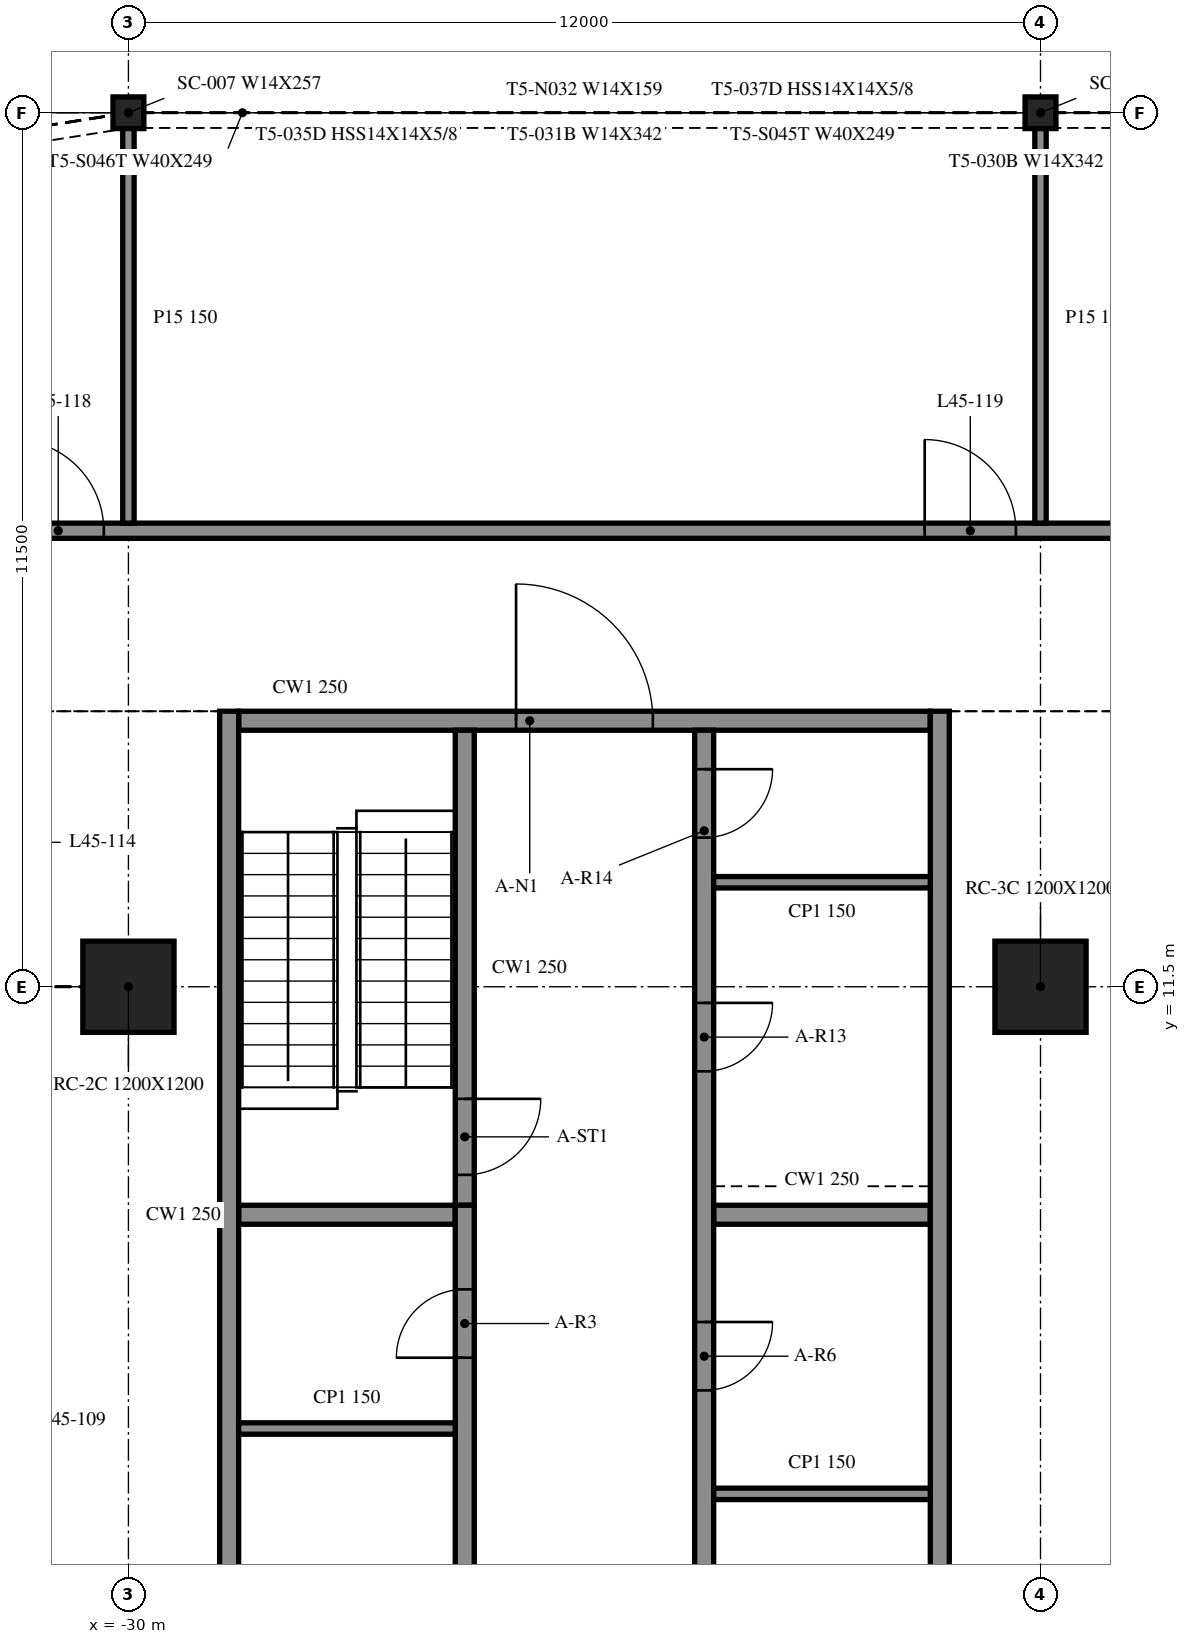
"""IFC4 building model, lengths in metres.
Left out: names, types, materials, properties, quantities, classifications, styles, units other than length and angle.
Written with IfcOpenShell. Run it as: python <this file> out.ifc"""

import sys

from ifc_helpers import new_model, si_unit, direction, frame, frame_2d, origin, origin_2d, place, context, subcontext, project, spatial, rectangle, i_section, extrude, element, fill, save


model = new_model("IFC4")
c1 = context("Model", 3, precision=1e-05, world=origin(), true_north=direction((0.0, 1.0)))
c2 = subcontext(c1, "Body", "Model", "MODEL_VIEW")
j1 = project(units=[si_unit("LENGTHUNIT", "METRE"), si_unit("PLANEANGLEUNIT", "RADIAN")], contexts=[c1])
p1 = place(None, origin())
s1 = spatial("IfcSite", under=j1, at=p1, CompositionType="ELEMENT")
p2 = place(p1, origin())
s2 = spatial("IfcBuilding", under=s1, at=p2, CompositionType="ELEMENT")
p3 = place(p2, frame((0.0, 0.0, 189.6)))
s3 = spatial("IfcBuildingStorey", under=s2, at=p3, CompositionType="ELEMENT", Elevation=189.6)
for number, where, z_axis, x_axis in (
    (1, (-30.0, 11.5, -0.4), (0.0, 0.0, 1.0), (1.0, 0.0, 0.0)),
    (2, (-18.0, 11.5, -0.4), (0.0, 0.0, 1.0), (1.0, 0.0, 0.0)),
):
    element("IfcColumn", number, at=place(p3, frame(where, z_axis=z_axis, x_axis=x_axis)), inside=s3, PredefinedType="COLUMN", context=c2, shape_type="SweptSolid", body=[
        extrude(rectangle(XDim=1.2, YDim=1.2, at=origin_2d()), origin(), (0.0, 0.0, 1.0), 4.36),
    ])
for number, where, z_axis, x_axis in (
    (3, (-18.0, 23.0, -0.4), (0.0, 0.0, 1.0), (1.0, 0.0, 0.0)),
    (4, (-30.0, 23.0, -0.4), (0.0, 0.0, 1.0), (1.0, 0.0, 0.0)),
):
    element("IfcColumn", number, at=place(p3, frame(where, z_axis=z_axis, x_axis=x_axis)), inside=s3, PredefinedType="COLUMN", context=c2, shape_type="SweptSolid", body=[
        extrude(i_section(OverallWidth=0.406, OverallDepth=0.417, WebThickness=0.03, FlangeThickness=0.048, at=origin_2d()), origin(), (0.0, 0.0, 1.0), 4.36),
    ])
for number, where, z_axis, x_axis in (
    (5, (-28.675, 15.125, 0.0), (0.0, 0.0, 1.0), (0.0, -1.0, 0.0)),
    (6, (-19.325, -9.125, 0.0), (0.0, 0.0, 1.0), (0.0, 1.0, 0.0)),
):
    element("IfcWall", number, at=place(p3, frame(where, z_axis=z_axis, x_axis=x_axis)), inside=s3, PredefinedType="SOLIDWALL", context=c2, shape_type="SweptSolid", body=[
        extrude(rectangle(XDim=24.25, YDim=0.25, at=frame_2d((12.125, 0.0))), origin(), (0.0, 0.0, 1.0), 3.96),
    ])
p4 = place(p3, frame((-28.55, 15.0, 0.0), z_axis=(0.0, 0.0, 1.0), x_axis=(1.0, 0.0, 0.0)))
e7 = element("IfcWall", 7, at=p4, inside=s3, PredefinedType="SOLIDWALL", context=c2, shape_type="SweptSolid", body=[
    extrude(rectangle(XDim=9.1, YDim=0.25, at=frame_2d((4.55, 0.0))), origin(), (0.0, 0.0, 1.0), 3.96),
])
p5 = place(p4, frame((3.65, 0.0, 0.0)))
e8 = element("IfcOpeningElement", 8, at=p5, cuts=e7, PredefinedType="OPENING", context=c2, shape_type="SweptSolid", body=[
    extrude(rectangle(XDim=1.8, YDim=2.1, at=frame_2d((0.9, 1.05))), frame((0.0, 0.135, 0.0), z_axis=(0.0, -1.0, 0.0), x_axis=(1.0, 0.0, 0.0)), (0.0, 0.0, 1.0), 0.27),
])
p6 = place(p3, frame((-25.575, -8.875, 0.0), z_axis=(0.0, 0.0, 1.0), x_axis=(0.0, 1.0, 0.0)))
e9 = element("IfcWall", 9, at=p6, inside=s3, PredefinedType="SOLIDWALL", context=c2, shape_type="SweptSolid", body=[
    extrude(rectangle(XDim=17.5, YDim=0.25, at=frame_2d((8.75, 0.0))), origin(), (0.0, 0.0, 1.0), 3.96),
])
p7 = place(p6, frame((7.356, 0.0, 0.0)))
e10 = element("IfcOpeningElement", 10, at=p7, cuts=e9, PredefinedType="OPENING", context=c2, shape_type="SweptSolid", body=[
    extrude(rectangle(XDim=0.9, YDim=2.1, at=frame_2d((0.45, 1.05))), frame((0.0, 0.135, 0.0), z_axis=(0.0, -1.0, 0.0), x_axis=(1.0, 0.0, 0.0)), (0.0, 0.0, 1.0), 0.27),
])
p8 = place(p6, frame((11.425, 0.0, 0.0)))
e11 = element("IfcOpeningElement", 11, at=p8, cuts=e9, PredefinedType="OPENING", context=c2, shape_type="SweptSolid", body=[
    extrude(rectangle(XDim=0.9, YDim=2.1, at=frame_2d((0.45, 1.05))), frame((0.0, 0.135, 0.0), z_axis=(0.0, -1.0, 0.0), x_axis=(1.0, 0.0, 0.0)), (0.0, 0.0, 1.0), 0.27),
])
p9 = place(p6, frame((15.494, 0.0, 0.0)))
e12 = element("IfcOpeningElement", 12, at=p9, cuts=e9, PredefinedType="OPENING", context=c2, shape_type="SweptSolid", body=[
    extrude(rectangle(XDim=0.9, YDim=2.1, at=frame_2d((0.45, 1.05))), frame((0.0, 0.135, 0.0), z_axis=(0.0, -1.0, 0.0), x_axis=(1.0, 0.0, 0.0)), (0.0, 0.0, 1.0), 0.27),
])
p10 = place(p6, frame((0.512, 0.0, 0.0)))
e13 = element("IfcOpeningElement", 13, at=p10, cuts=e9, PredefinedType="OPENING", context=c2, shape_type="SweptSolid", body=[
    extrude(rectangle(XDim=0.9, YDim=2.1, at=frame_2d((0.45, 1.05))), frame((0.0, 0.135, 0.0), z_axis=(0.0, -1.0, 0.0), x_axis=(1.0, 0.0, 0.0)), (0.0, 0.0, 1.0), 0.27),
])
p11 = place(p6, frame((2.55, 0.0, 0.0)))
e14 = element("IfcOpeningElement", 14, at=p11, cuts=e9, PredefinedType="OPENING", context=c2, shape_type="SweptSolid", body=[
    extrude(rectangle(XDim=0.9, YDim=2.1, at=frame_2d((0.45, 1.05))), frame((0.0, 0.135, 0.0), z_axis=(0.0, -1.0, 0.0), x_axis=(1.0, 0.0, 0.0)), (0.0, 0.0, 1.0), 0.27),
])
p12 = place(p6, frame((4.587, 0.0, 0.0)))
e15 = element("IfcOpeningElement", 15, at=p12, cuts=e9, PredefinedType="OPENING", context=c2, shape_type="SweptSolid", body=[
    extrude(rectangle(XDim=0.9, YDim=2.1, at=frame_2d((0.45, 1.05))), frame((0.0, 0.135, 0.0), z_axis=(0.0, -1.0, 0.0), x_axis=(1.0, 0.0, 0.0)), (0.0, 0.0, 1.0), 0.27),
])
p13 = place(p3, frame((-25.575, 14.875, 0.0), z_axis=(0.0, 0.0, 1.0), x_axis=(0.0, -1.0, 0.0)))
e16 = element("IfcWall", 16, at=p13, inside=s3, PredefinedType="SOLIDWALL", context=c2, shape_type="SweptSolid", body=[
    extrude(rectangle(XDim=6.25, YDim=0.25, at=frame_2d((3.125, 0.0))), origin(), (0.0, 0.0, 1.0), 3.96),
])
p14 = place(p13, frame((4.85, 0.0, 0.0)))
e17 = element("IfcOpeningElement", 17, at=p14, cuts=e16, PredefinedType="OPENING", context=c2, shape_type="SweptSolid", body=[
    extrude(rectangle(XDim=1.0, YDim=2.1, at=frame_2d((0.5, 1.05))), frame((0.0, 0.135, 0.0), z_axis=(0.0, -1.0, 0.0), x_axis=(1.0, 0.0, 0.0)), (0.0, 0.0, 1.0), 0.27),
])
p15 = place(p3, frame((-22.425, 14.875, 0.0), z_axis=(0.0, 0.0, 1.0), x_axis=(0.0, -1.0, 0.0)))
e18 = element("IfcWall", 18, at=p15, inside=s3, PredefinedType="SOLIDWALL", context=c2, shape_type="SweptSolid", body=[
    extrude(rectangle(XDim=23.75, YDim=0.25, at=frame_2d((11.875, 0.0))), origin(), (0.0, 0.0, 1.0), 3.96),
])
p16 = place(p15, frame((15.01, 0.0, 0.0)))
e19 = element("IfcOpeningElement", 19, at=p16, cuts=e18, PredefinedType="OPENING", context=c2, shape_type="SweptSolid", body=[
    extrude(rectangle(XDim=0.9, YDim=2.1, at=frame_2d((0.45, 1.05))), frame((0.0, 0.135, 0.0), z_axis=(0.0, -1.0, 0.0), x_axis=(1.0, 0.0, 0.0)), (0.0, 0.0, 1.0), 0.27),
])
p17 = place(p15, frame((11.371, 0.0, 0.0)))
e20 = element("IfcOpeningElement", 20, at=p17, cuts=e18, PredefinedType="OPENING", context=c2, shape_type="SweptSolid", body=[
    extrude(rectangle(XDim=0.9, YDim=2.1, at=frame_2d((0.45, 1.05))), frame((0.0, 0.135, 0.0), z_axis=(0.0, -1.0, 0.0), x_axis=(1.0, 0.0, 0.0)), (0.0, 0.0, 1.0), 0.27),
])
p18 = place(p15, frame((7.786, 0.0, 0.0)))
e21 = element("IfcOpeningElement", 21, at=p18, cuts=e18, PredefinedType="OPENING", context=c2, shape_type="SweptSolid", body=[
    extrude(rectangle(XDim=0.9, YDim=2.1, at=frame_2d((0.45, 1.05))), frame((0.0, 0.135, 0.0), z_axis=(0.0, -1.0, 0.0), x_axis=(1.0, 0.0, 0.0)), (0.0, 0.0, 1.0), 0.27),
])
p19 = place(p15, frame((22.337, 0.0, 0.0)))
e22 = element("IfcOpeningElement", 22, at=p19, cuts=e18, PredefinedType="OPENING", context=c2, shape_type="SweptSolid", body=[
    extrude(rectangle(XDim=0.9, YDim=2.1, at=frame_2d((0.45, 1.05))), frame((0.0, 0.135, 0.0), z_axis=(0.0, -1.0, 0.0), x_axis=(1.0, 0.0, 0.0)), (0.0, 0.0, 1.0), 0.27),
])
p20 = place(p15, frame((20.3, 0.0, 0.0)))
e23 = element("IfcOpeningElement", 23, at=p20, cuts=e18, PredefinedType="OPENING", context=c2, shape_type="SweptSolid", body=[
    extrude(rectangle(XDim=0.9, YDim=2.1, at=frame_2d((0.45, 1.05))), frame((0.0, 0.135, 0.0), z_axis=(0.0, -1.0, 0.0), x_axis=(1.0, 0.0, 0.0)), (0.0, 0.0, 1.0), 0.27),
])
p21 = place(p15, frame((18.262, 0.0, 0.0)))
e24 = element("IfcOpeningElement", 24, at=p21, cuts=e18, PredefinedType="OPENING", context=c2, shape_type="SweptSolid", body=[
    extrude(rectangle(XDim=0.9, YDim=2.1, at=frame_2d((0.45, 1.05))), frame((0.0, 0.135, 0.0), z_axis=(0.0, -1.0, 0.0), x_axis=(1.0, 0.0, 0.0)), (0.0, 0.0, 1.0), 0.27),
])
p22 = place(p15, frame((3.587, 0.0, 0.0)))
e25 = element("IfcOpeningElement", 25, at=p22, cuts=e18, PredefinedType="OPENING", context=c2, shape_type="SweptSolid", body=[
    extrude(rectangle(XDim=0.9, YDim=2.1, at=frame_2d((0.45, 1.05))), frame((0.0, 0.135, 0.0), z_axis=(0.0, -1.0, 0.0), x_axis=(1.0, 0.0, 0.0)), (0.0, 0.0, 1.0), 0.27),
])
p23 = place(p15, frame((0.512, 0.0, 0.0)))
e26 = element("IfcOpeningElement", 26, at=p23, cuts=e18, PredefinedType="OPENING", context=c2, shape_type="SweptSolid", body=[
    extrude(rectangle(XDim=0.9, YDim=2.1, at=frame_2d((0.45, 1.05))), frame((0.0, 0.135, 0.0), z_axis=(0.0, -1.0, 0.0), x_axis=(1.0, 0.0, 0.0)), (0.0, 0.0, 1.0), 0.27),
])
for number, where, z_axis, x_axis in (
    (27, (-28.55, 8.5, 0.0), (0.0, 0.0, 1.0), (1.0, 0.0, 0.0)),
    (28, (-22.3, 8.5, 0.0), (0.0, 0.0, 1.0), (1.0, 0.0, 0.0)),
):
    element("IfcWall", number, at=place(p3, frame(where, z_axis=z_axis, x_axis=x_axis)), inside=s3, PredefinedType="SOLIDWALL", context=c2, shape_type="SweptSolid", body=[
        extrude(rectangle(XDim=2.85, YDim=0.25, at=frame_2d((1.425, 0.0))), origin(), (0.0, 0.0, 1.0), 3.96),
    ])
for number, where, z_axis, x_axis in (
    (29, (-28.55, 5.688, 0.0), (0.0, 0.0, 1.0), (1.0, 0.0, 0.0)),
    (30, (-22.3, 4.827, 0.0), (0.0, 0.0, 1.0), (1.0, 0.0, 0.0)),
    (31, (-22.3, 12.875, 0.0), (0.0, 0.0, 1.0), (1.0, 0.0, 0.0)),
):
    element("IfcWall", number, at=place(p3, frame(where, z_axis=z_axis, x_axis=x_axis)), inside=s3, PredefinedType="PARTITIONING", context=c2, shape_type="SweptSolid", body=[
        extrude(rectangle(XDim=2.85, YDim=0.15, at=frame_2d((1.425, 0.0))), origin(), (0.0, 0.0, 1.0), 3.96),
    ])
p24 = place(p3, frame((-40.624, 17.5, 0.0), z_axis=(0.0, 0.0, 1.0), x_axis=(1.0, 0.0, 0.0)))
e32 = element("IfcWall", 32, at=p24, inside=s3, PredefinedType="PARTITIONING", context=c2, shape_type="SweptSolid", body=[
    extrude(rectangle(XDim=94.524, YDim=0.2, at=frame_2d((47.262, 0.0))), origin(), (0.0, 0.0, 1.0), 3.96),
])
p25 = place(p24, frame((9.1, 0.0, 0.0)))
e33 = element("IfcOpeningElement", 33, at=p25, cuts=e32, PredefinedType="OPENING", context=c2, shape_type="SweptSolid", body=[
    extrude(rectangle(XDim=1.2, YDim=2.1, at=frame_2d((0.6, 1.05))), frame((0.0, 0.11, 0.0), z_axis=(0.0, -1.0, 0.0), x_axis=(1.0, 0.0, 0.0)), (0.0, 0.0, 1.0), 0.22),
])
p26 = place(p24, frame((21.1, 0.0, 0.0)))
e34 = element("IfcOpeningElement", 34, at=p26, cuts=e32, PredefinedType="OPENING", context=c2, shape_type="SweptSolid", body=[
    extrude(rectangle(XDim=1.2, YDim=2.1, at=frame_2d((0.6, 1.05))), frame((0.0, 0.11, 0.0), z_axis=(0.0, -1.0, 0.0), x_axis=(1.0, 0.0, 0.0)), (0.0, 0.0, 1.0), 0.22),
])
p27 = place(p24, frame((33.3, 0.0, 0.0)))
e35 = element("IfcOpeningElement", 35, at=p27, cuts=e32, PredefinedType="OPENING", context=c2, shape_type="SweptSolid", body=[
    extrude(rectangle(XDim=1.0, YDim=2.1, at=frame_2d((0.5, 1.05))), frame((0.0, 0.11, 0.0), z_axis=(0.0, -1.0, 0.0), x_axis=(1.0, 0.0, 0.0)), (0.0, 0.0, 1.0), 0.22),
])
p28 = place(p24, frame((45.5, 0.0, 0.0)))
e36 = element("IfcOpeningElement", 36, at=p28, cuts=e32, PredefinedType="OPENING", context=c2, shape_type="SweptSolid", body=[
    extrude(rectangle(XDim=0.9, YDim=2.1, at=frame_2d((0.45, 1.05))), frame((0.0, 0.11, 0.0), z_axis=(0.0, -1.0, 0.0), x_axis=(1.0, 0.0, 0.0)), (0.0, 0.0, 1.0), 0.22),
])
p29 = place(p24, frame((46.9, 0.0, 0.0)))
e37 = element("IfcOpeningElement", 37, at=p29, cuts=e32, PredefinedType="OPENING", context=c2, shape_type="SweptSolid", body=[
    extrude(rectangle(XDim=1.0, YDim=2.1, at=frame_2d((0.5, 1.05))), frame((0.0, 0.11, 0.0), z_axis=(0.0, -1.0, 0.0), x_axis=(1.0, 0.0, 0.0)), (0.0, 0.0, 1.0), 0.22),
])
p30 = place(p24, frame((58.9, 0.0, 0.0)))
e38 = element("IfcOpeningElement", 38, at=p30, cuts=e32, PredefinedType="OPENING", context=c2, shape_type="SweptSolid", body=[
    extrude(rectangle(XDim=1.0, YDim=2.1, at=frame_2d((0.5, 1.05))), frame((0.0, 0.11, 0.0), z_axis=(0.0, -1.0, 0.0), x_axis=(1.0, 0.0, 0.0)), (0.0, 0.0, 1.0), 0.22),
])
p31 = place(p24, frame((70.9, 0.0, 0.0)))
e39 = element("IfcOpeningElement", 39, at=p31, cuts=e32, PredefinedType="OPENING", context=c2, shape_type="SweptSolid", body=[
    extrude(rectangle(XDim=1.2, YDim=2.1, at=frame_2d((0.6, 1.05))), frame((0.0, 0.11, 0.0), z_axis=(0.0, -1.0, 0.0), x_axis=(1.0, 0.0, 0.0)), (0.0, 0.0, 1.0), 0.22),
])
p32 = place(p24, frame((82.9, 0.0, 0.0)))
e40 = element("IfcOpeningElement", 40, at=p32, cuts=e32, PredefinedType="OPENING", context=c2, shape_type="SweptSolid", body=[
    extrude(rectangle(XDim=1.2, YDim=2.1, at=frame_2d((0.6, 1.05))), frame((0.0, 0.11, 0.0), z_axis=(0.0, -1.0, 0.0), x_axis=(1.0, 0.0, 0.0)), (0.0, 0.0, 1.0), 0.22),
])
for number, where, z_axis, x_axis in (
    (41, (-30.0, 17.6, 0.0), (0.0, 0.0, 1.0), (0.0, 1.0, 0.0)),
    (42, (-18.0, 17.6, 0.0), (0.0, 0.0, 1.0), (0.0, 1.0, 0.0)),
):
    element("IfcWall", number, at=place(p3, frame(where, z_axis=z_axis, x_axis=x_axis)), inside=s3, PredefinedType="PARTITIONING", context=c2, shape_type="SweptSolid", body=[
        extrude(rectangle(XDim=5.4, YDim=0.15, at=frame_2d((2.7, 0.0))), origin(), (0.0, 0.0, 1.0), 3.96),
    ])
p33 = place(p5, origin())
e43 = element("IfcDoor", 43, at=p33, inside=s3, OperationType="DOUBLE_DOOR_SINGLE_SWING", PredefinedType="DOOR", context=c2, shape_type="SweptSolid", body=[
    extrude(rectangle(XDim=1.8, YDim=2.1, at=frame_2d((0.9, 1.05))), frame((0.0, 0.025, 0.0), z_axis=(0.0, -1.0, 0.0), x_axis=(1.0, 0.0, 0.0)), (0.0, 0.0, 1.0), 0.05),
])
fill(e8, e43)
p34 = place(p9, origin())
e44 = element("IfcDoor", 44, at=p34, inside=s3, OperationType="SINGLE_SWING_LEFT", PredefinedType="DOOR", context=c2, shape_type="SweptSolid", body=[
    extrude(rectangle(XDim=0.9, YDim=2.1, at=frame_2d((0.45, 1.05))), frame((0.0, 0.025, 0.0), z_axis=(0.0, -1.0, 0.0), x_axis=(1.0, 0.0, 0.0)), (0.0, 0.0, 1.0), 0.05),
])
fill(e12, e44)
p35 = place(p18, origin())
e45 = element("IfcDoor", 45, at=p35, inside=s3, OperationType="SINGLE_SWING_RIGHT", PredefinedType="DOOR", context=c2, shape_type="SweptSolid", body=[
    extrude(rectangle(XDim=0.9, YDim=2.1, at=frame_2d((0.45, 1.05))), frame((0.0, 0.025, 0.0), z_axis=(0.0, -1.0, 0.0), x_axis=(1.0, 0.0, 0.0)), (0.0, 0.0, 1.0), 0.05),
])
fill(e21, e45)
p36 = place(p22, origin())
e46 = element("IfcDoor", 46, at=p36, inside=s3, OperationType="SINGLE_SWING_LEFT", PredefinedType="DOOR", context=c2, shape_type="SweptSolid", body=[
    extrude(rectangle(XDim=0.9, YDim=2.1, at=frame_2d((0.45, 1.05))), frame((0.0, 0.025, 0.0), z_axis=(0.0, -1.0, 0.0), x_axis=(1.0, 0.0, 0.0)), (0.0, 0.0, 1.0), 0.05),
])
fill(e25, e46)
p37 = place(p23, origin())
e47 = element("IfcDoor", 47, at=p37, inside=s3, OperationType="SINGLE_SWING_RIGHT", PredefinedType="DOOR", context=c2, shape_type="SweptSolid", body=[
    extrude(rectangle(XDim=0.9, YDim=2.1, at=frame_2d((0.45, 1.05))), frame((0.0, 0.025, 0.0), z_axis=(0.0, -1.0, 0.0), x_axis=(1.0, 0.0, 0.0)), (0.0, 0.0, 1.0), 0.05),
])
fill(e26, e47)
p38 = place(p14, origin())
e48 = element("IfcDoor", 48, at=p38, inside=s3, OperationType="SINGLE_SWING_LEFT", PredefinedType="DOOR", context=c2, shape_type="SweptSolid", body=[
    extrude(rectangle(XDim=1.0, YDim=2.1, at=frame_2d((0.5, 1.05))), frame((0.0, 0.025, 0.0), z_axis=(0.0, -1.0, 0.0), x_axis=(1.0, 0.0, 0.0)), (0.0, 0.0, 1.0), 0.05),
])
fill(e17, e48)
p39 = place(p25, origin())
e49 = element("IfcDoor", 49, at=p39, inside=s3, OperationType="SINGLE_SWING_LEFT", PredefinedType="DOOR", context=c2, shape_type="SweptSolid", body=[
    extrude(rectangle(XDim=1.2, YDim=2.1, at=frame_2d((0.6, 1.05))), frame((0.0, 0.025, 0.0), z_axis=(0.0, -1.0, 0.0), x_axis=(1.0, 0.0, 0.0)), (0.0, 0.0, 1.0), 0.05),
])
fill(e33, e49)
p40 = place(p26, origin())
e50 = element("IfcDoor", 50, at=p40, inside=s3, OperationType="SINGLE_SWING_LEFT", PredefinedType="DOOR", context=c2, shape_type="SweptSolid", body=[
    extrude(rectangle(XDim=1.2, YDim=2.1, at=frame_2d((0.6, 1.05))), frame((0.0, 0.025, 0.0), z_axis=(0.0, -1.0, 0.0), x_axis=(1.0, 0.0, 0.0)), (0.0, 0.0, 1.0), 0.05),
])
fill(e34, e50)
save(model, sys.argv[1])
